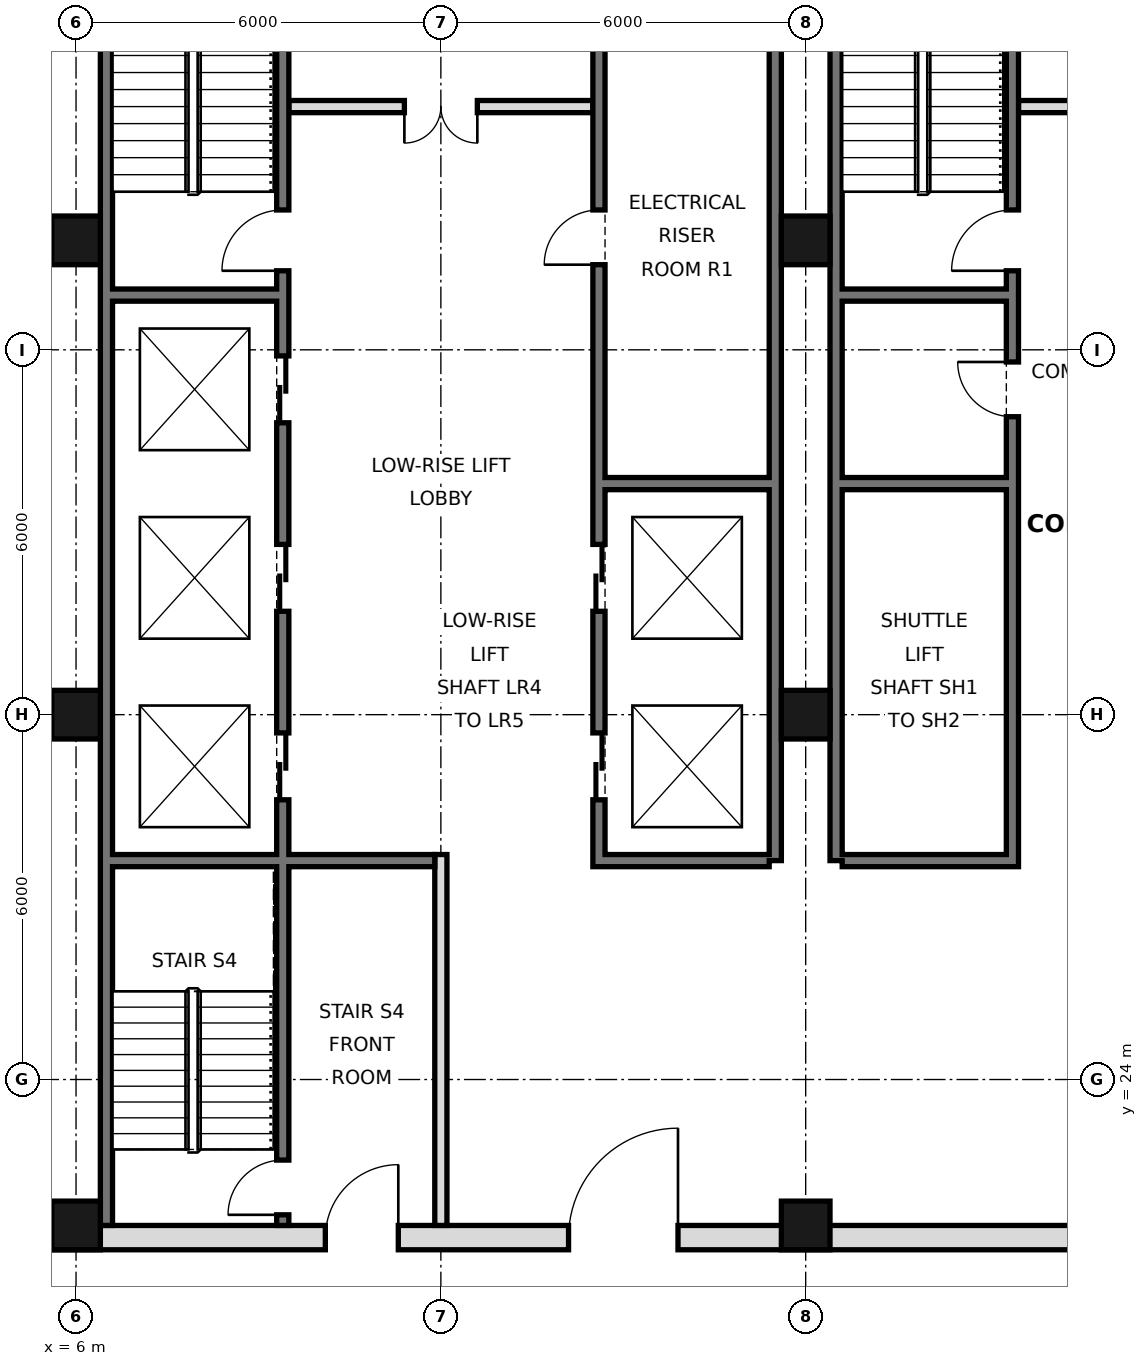
"""IFC4 building model, lengths in metres.
Left out: names, types, materials, properties, quantities, classifications, styles, units other than length and angle.
Written with IfcOpenShell. Run it as: python <this file> out.ifc"""

import sys

from ifc_helpers import new_model, si_unit, direction, frame, frame_2d, origin, origin_2d, place, context, subcontext, project, spatial, rectangle, hollow_rectangle, extrude, element, fill, save


model = new_model("IFC4")
c1 = context("Model", 3, precision=1e-05, world=origin(), true_north=direction((0.0, 1.0)))
c2 = subcontext(c1, "Body", "Model", "MODEL_VIEW")
j1 = project(units=[si_unit("LENGTHUNIT", "METRE"), si_unit("PLANEANGLEUNIT", "RADIAN")], contexts=[c1])
p1 = place(None, origin())
s1 = spatial("IfcSite", under=j1, at=p1, CompositionType="ELEMENT")
p2 = place(p1, origin())
s2 = spatial("IfcBuilding", under=s1, at=p2, CompositionType="ELEMENT")
p3 = place(p2, frame((0.0, 0.0, 49.8)))
s3 = spatial("IfcBuildingStorey", under=s2, at=p3, CompositionType="ELEMENT", Elevation=49.8)
for number, where, z_axis, x_axis in (
    (1, (6.0, 21.6, 0.0), (0.0, 0.0, 1.0), (1.0, 0.0, 0.0)),
    (2, (6.0, 30.0, 0.0), (0.0, 0.0, 1.0), (1.0, 0.0, 0.0)),
    (3, (6.0, 37.8, 0.0), (0.0, 0.0, 1.0), (1.0, 0.0, 0.0)),
    (4, (18.0, 21.6, 0.0), (0.0, 0.0, 1.0), (1.0, 0.0, 0.0)),
    (5, (18.0, 30.0, 0.0), (0.0, 0.0, 1.0), (1.0, 0.0, 0.0)),
    (6, (18.0, 37.8, 0.0), (0.0, 0.0, 1.0), (1.0, 0.0, 0.0)),
):
    element("IfcColumn", number, at=place(p3, frame(where, z_axis=z_axis, x_axis=x_axis)), inside=s3, PredefinedType="COLUMN", context=c2, shape_type="SweptSolid", body=[
        extrude(hollow_rectangle(XDim=0.8, YDim=0.8, WallThickness=0.06, at=origin_2d()), origin(), (0.0, 0.0, 1.0), 3.6),
    ])
p4 = place(p3, frame((6.5, 21.6, 0.0), z_axis=(0.0, 0.0, 1.0), x_axis=(0.0, 1.0, 0.0)))
e7 = element("IfcWall", 7, at=p4, inside=s3, PredefinedType="SOLIDWALL", context=c2, shape_type="SweptSolid", body=[
    extrude(rectangle(XDim=23.5, YDim=0.2, at=frame_2d((11.75, 0.0))), origin(), (0.0, 0.0, 1.0), 3.42),
])
for number, where, z_axis, x_axis in (
    (8, (17.5, 27.6, 0.0), (0.0, 0.0, 1.0), (0.0, 1.0, 0.0)),
    (9, (18.5, 27.6, 0.0), (0.0, 0.0, 1.0), (0.0, 1.0, 0.0)),
):
    element("IfcWall", number, at=place(p3, frame(where, z_axis=z_axis, x_axis=x_axis)), inside=s3, PredefinedType="SOLIDWALL", context=c2, shape_type="SweptSolid", body=[
        extrude(rectangle(XDim=17.5, YDim=0.2, at=frame_2d((8.75, 0.0))), origin(), (0.0, 0.0, 1.0), 3.42),
    ])
p5 = place(p3, frame((5.6, 21.4, 0.0), z_axis=(0.0, 0.0, 1.0), x_axis=(1.0, 0.0, 0.0)))
e10 = element("IfcWall", 10, at=p5, inside=s3, PredefinedType="SOLIDWALL", context=c2, shape_type="SweptSolid", body=[
    extrude(rectangle(XDim=36.8, YDim=0.4, at=frame_2d((18.4, 0.0))), origin(), (0.0, 0.0, 1.0), 3.42),
])
p6 = place(p5, frame((8.5, 0.0, 0.0)))
e11 = element("IfcOpeningElement", 11, at=p6, cuts=e10, PredefinedType="OPENING", context=c2, shape_type="SweptSolid", body=[
    extrude(rectangle(XDim=1.8, YDim=2.1, at=frame_2d((0.9, 1.05))), frame((0.0, 0.21, 0.0), z_axis=(0.0, -1.0, 0.0), x_axis=(1.0, 0.0, 0.0)), (0.0, 0.0, 1.0), 0.42),
])
p7 = place(p5, frame((17.5, 0.0, 0.0)))
e12 = element("IfcOpeningElement", 12, at=p7, cuts=e10, PredefinedType="OPENING", context=c2, shape_type="SweptSolid", body=[
    extrude(rectangle(XDim=1.8, YDim=2.1, at=frame_2d((0.9, 1.05))), frame((0.0, 0.21, 0.0), z_axis=(0.0, -1.0, 0.0), x_axis=(1.0, 0.0, 0.0)), (0.0, 0.0, 1.0), 0.42),
])
p8 = place(p5, frame((26.5, 0.0, 0.0)))
e13 = element("IfcOpeningElement", 13, at=p8, cuts=e10, PredefinedType="OPENING", context=c2, shape_type="SweptSolid", body=[
    extrude(rectangle(XDim=1.8, YDim=2.1, at=frame_2d((0.9, 1.05))), frame((0.0, 0.21, 0.0), z_axis=(0.0, -1.0, 0.0), x_axis=(1.0, 0.0, 0.0)), (0.0, 0.0, 1.0), 0.42),
])
p9 = place(p5, frame((4.5, 0.0, 0.0)))
e14 = element("IfcOpeningElement", 14, at=p9, cuts=e10, PredefinedType="OPENING", context=c2, shape_type="SweptSolid", body=[
    extrude(rectangle(XDim=1.2, YDim=2.1, at=frame_2d((0.6, 1.05))), frame((0.0, 0.21, 0.0), z_axis=(0.0, -1.0, 0.0), x_axis=(1.0, 0.0, 0.0)), (0.0, 0.0, 1.0), 0.42),
])
p10 = place(p5, frame((31.1, 0.0, 0.0)))
e15 = element("IfcOpeningElement", 15, at=p10, cuts=e10, PredefinedType="OPENING", context=c2, shape_type="SweptSolid", body=[
    extrude(rectangle(XDim=1.2, YDim=2.1, at=frame_2d((0.6, 1.05))), frame((0.0, 0.21, 0.0), z_axis=(0.0, -1.0, 0.0), x_axis=(1.0, 0.0, 0.0)), (0.0, 0.0, 1.0), 0.42),
])
p11 = place(p3, frame((12.0, 21.6, 0.0), z_axis=(0.0, 0.0, 1.0), x_axis=(0.0, 1.0, 0.0)))
e16 = element("IfcWall", 16, at=p11, inside=s3, PredefinedType="PARTITIONING", context=c2, shape_type="SweptSolid", body=[
    extrude(rectangle(XDim=6.1, YDim=0.2, at=frame_2d((3.05, 0.0))), origin(), (0.0, 0.0, 1.0), 3.42),
])
p12 = place(p3, frame((14.6, 27.5, 0.0), z_axis=(0.0, 0.0, 1.0), x_axis=(0.0, 1.0, 0.0)))
e17 = element("IfcWall", 17, at=p12, inside=s3, PredefinedType="SOLIDWALL", context=c2, shape_type="SweptSolid", body=[
    extrude(rectangle(XDim=17.5, YDim=0.2, at=frame_2d((8.75, 0.0))), origin(), (0.0, 0.0, 1.0), 3.42),
])
p13 = place(p12, frame((1.1, 0.0, 0.0)))
e18 = element("IfcOpeningElement", 18, at=p13, cuts=e17, PredefinedType="OPENING", context=c2, shape_type="SweptSolid", body=[
    extrude(rectangle(XDim=1.1, YDim=2.1, at=frame_2d((0.55, 1.05))), frame((0.0, 0.11, 0.0), z_axis=(0.0, -1.0, 0.0), x_axis=(1.0, 0.0, 0.0)), (0.0, 0.0, 1.0), 0.22),
])
p14 = place(p12, frame((4.2, 0.0, 0.0)))
e19 = element("IfcOpeningElement", 19, at=p14, cuts=e17, PredefinedType="OPENING", context=c2, shape_type="SweptSolid", body=[
    extrude(rectangle(XDim=1.1, YDim=2.1, at=frame_2d((0.55, 1.05))), frame((0.0, 0.11, 0.0), z_axis=(0.0, -1.0, 0.0), x_axis=(1.0, 0.0, 0.0)), (0.0, 0.0, 1.0), 0.22),
])
p15 = place(p12, frame((15.4, 0.0, 0.0)))
e20 = element("IfcOpeningElement", 20, at=p15, cuts=e17, PredefinedType="OPENING", context=c2, shape_type="SweptSolid", body=[
    extrude(rectangle(XDim=1.1, YDim=2.1, at=frame_2d((0.55, 1.05))), frame((0.0, 0.11, 0.0), z_axis=(0.0, -1.0, 0.0), x_axis=(1.0, 0.0, 0.0)), (0.0, 0.0, 1.0), 0.22),
])
p16 = place(p12, frame((9.9, 0.0, 0.0)))
e21 = element("IfcOpeningElement", 21, at=p16, cuts=e17, PredefinedType="OPENING", context=c2, shape_type="SweptSolid", body=[
    extrude(rectangle(XDim=0.9, YDim=2.1, at=frame_2d((0.45, 1.05))), frame((0.0, 0.11, 0.0), z_axis=(0.0, -1.0, 0.0), x_axis=(1.0, 0.0, 0.0)), (0.0, 0.0, 1.0), 0.22),
])
p17 = place(p3, frame((21.4, 27.5, 0.0), z_axis=(0.0, 0.0, 1.0), x_axis=(0.0, 1.0, 0.0)))
e22 = element("IfcWall", 22, at=p17, inside=s3, PredefinedType="SOLIDWALL", context=c2, shape_type="SweptSolid", body=[
    extrude(rectangle(XDim=17.5, YDim=0.2, at=frame_2d((8.75, 0.0))), origin(), (0.0, 0.0, 1.0), 3.42),
])
p18 = place(p17, frame((9.8, 0.0, 0.0)))
e23 = element("IfcOpeningElement", 23, at=p18, cuts=e22, PredefinedType="OPENING", context=c2, shape_type="SweptSolid", body=[
    extrude(rectangle(XDim=1.0, YDim=2.1, at=frame_2d((0.5, 1.05))), frame((0.0, 0.11, 0.0), z_axis=(0.0, -1.0, 0.0), x_axis=(1.0, 0.0, 0.0)), (0.0, 0.0, 1.0), 0.22),
])
p19 = place(p17, frame((7.4, 0.0, 0.0)))
e24 = element("IfcOpeningElement", 24, at=p19, cuts=e22, PredefinedType="OPENING", context=c2, shape_type="SweptSolid", body=[
    extrude(rectangle(XDim=0.9, YDim=2.1, at=frame_2d((0.45, 1.05))), frame((0.0, 0.11, 0.0), z_axis=(0.0, -1.0, 0.0), x_axis=(1.0, 0.0, 0.0)), (0.0, 0.0, 1.0), 0.22),
])
p20 = place(p3, frame((9.4, 21.6, 0.0), z_axis=(0.0, 0.0, 1.0), x_axis=(0.0, 1.0, 0.0)))
e25 = element("IfcWall", 25, at=p20, inside=s3, PredefinedType="SOLIDWALL", context=c2, shape_type="SweptSolid", body=[
    extrude(rectangle(XDim=23.4, YDim=0.2, at=frame_2d((11.7, 0.0))), origin(), (0.0, 0.0, 1.0), 3.42),
])
p21 = place(p20, frame((7.0, 0.0, 0.0)))
e26 = element("IfcOpeningElement", 26, at=p21, cuts=e25, PredefinedType="OPENING", context=c2, shape_type="SweptSolid", body=[
    extrude(rectangle(XDim=1.1, YDim=2.1, at=frame_2d((0.55, 1.05))), frame((0.0, 0.11, 0.0), z_axis=(0.0, -1.0, 0.0), x_axis=(1.0, 0.0, 0.0)), (0.0, 0.0, 1.0), 0.22),
])
p22 = place(p20, frame((10.1, 0.0, 0.0)))
e27 = element("IfcOpeningElement", 27, at=p22, cuts=e25, PredefinedType="OPENING", context=c2, shape_type="SweptSolid", body=[
    extrude(rectangle(XDim=1.1, YDim=2.1, at=frame_2d((0.55, 1.05))), frame((0.0, 0.11, 0.0), z_axis=(0.0, -1.0, 0.0), x_axis=(1.0, 0.0, 0.0)), (0.0, 0.0, 1.0), 0.22),
])
p23 = place(p20, frame((13.2, 0.0, 0.0)))
e28 = element("IfcOpeningElement", 28, at=p23, cuts=e25, PredefinedType="OPENING", context=c2, shape_type="SweptSolid", body=[
    extrude(rectangle(XDim=1.1, YDim=2.1, at=frame_2d((0.55, 1.05))), frame((0.0, 0.11, 0.0), z_axis=(0.0, -1.0, 0.0), x_axis=(1.0, 0.0, 0.0)), (0.0, 0.0, 1.0), 0.22),
])
p24 = place(p20, frame((15.7, 0.0, 0.0)))
e29 = element("IfcOpeningElement", 29, at=p24, cuts=e25, PredefinedType="OPENING", context=c2, shape_type="SweptSolid", body=[
    extrude(rectangle(XDim=1.0, YDim=2.1, at=frame_2d((0.5, 1.05))), frame((0.0, 0.11, 0.0), z_axis=(0.0, -1.0, 0.0), x_axis=(1.0, 0.0, 0.0)), (0.0, 0.0, 1.0), 0.22),
])
p25 = place(p20, frame((0.175, 0.0, 0.0)))
e30 = element("IfcOpeningElement", 30, at=p25, cuts=e25, PredefinedType="OPENING", context=c2, shape_type="SweptSolid", body=[
    extrude(rectangle(XDim=0.9, YDim=2.1, at=frame_2d((0.45, 1.05))), frame((0.0, 0.11, 0.0), z_axis=(0.0, -1.0, 0.0), x_axis=(1.0, 0.0, 0.0)), (0.0, 0.0, 1.0), 0.22),
])
for number, where, z_axis, x_axis in (
    (31, (14.7, 27.6, 0.0), (0.0, 0.0, 1.0), (1.0, 0.0, 0.0)),
    (32, (18.6, 27.6, 0.0), (0.0, 0.0, 1.0), (1.0, 0.0, 0.0)),
):
    element("IfcWall", number, at=place(p3, frame(where, z_axis=z_axis, x_axis=x_axis)), inside=s3, PredefinedType="SOLIDWALL", context=c2, shape_type="SweptSolid", body=[
        extrude(rectangle(XDim=2.7, YDim=0.2, at=frame_2d((1.35, 0.0))), origin(), (0.0, 0.0, 1.0), 3.42),
    ])
p26 = place(p3, frame((6.6, 27.6, 0.0), z_axis=(0.0, 0.0, 1.0), x_axis=(1.0, 0.0, 0.0)))
e33 = element("IfcWall", 33, at=p26, inside=s3, PredefinedType="SOLIDWALL", context=c2, shape_type="SweptSolid", body=[
    extrude(rectangle(XDim=5.3, YDim=0.2, at=frame_2d((2.65, 0.0))), origin(), (0.0, 0.0, 1.0), 3.42),
])
for number, where, z_axis, x_axis in (
    (34, (14.7, 33.8, 0.0), (0.0, 0.0, 1.0), (1.0, 0.0, 0.0)),
    (35, (18.6, 33.8, 0.0), (0.0, 0.0, 1.0), (1.0, 0.0, 0.0)),
    (36, (18.6, 36.9, 0.0), (0.0, 0.0, 1.0), (1.0, 0.0, 0.0)),
    (37, (6.6, 36.9, 0.0), (0.0, 0.0, 1.0), (1.0, 0.0, 0.0)),
):
    element("IfcWall", number, at=place(p3, frame(where, z_axis=z_axis, x_axis=x_axis)), inside=s3, PredefinedType="SOLIDWALL", context=c2, shape_type="SweptSolid", body=[
        extrude(rectangle(XDim=2.7, YDim=0.2, at=frame_2d((1.35, 0.0))), origin(), (0.0, 0.0, 1.0), 3.42),
    ])
p27 = place(p3, frame((21.5, 40.0, 0.0), z_axis=(0.0, 0.0, 1.0), x_axis=(1.0, 0.0, 0.0)))
e38 = element("IfcWall", 38, at=p27, inside=s3, PredefinedType="PARTITIONING", context=c2, shape_type="SweptSolid", body=[
    extrude(rectangle(XDim=7.9, YDim=0.2, at=frame_2d((3.95, 0.0))), origin(), (0.0, 0.0, 1.0), 3.42),
])
p28 = place(p27, frame((1.9, 0.0, 0.0)))
e39 = element("IfcOpeningElement", 39, at=p28, cuts=e38, PredefinedType="OPENING", context=c2, shape_type="SweptSolid", body=[
    extrude(rectangle(XDim=1.2, YDim=2.1, at=frame_2d((0.6, 1.05))), frame((0.0, 0.11, 0.0), z_axis=(0.0, -1.0, 0.0), x_axis=(1.0, 0.0, 0.0)), (0.0, 0.0, 1.0), 0.22),
])
p29 = place(p3, frame((9.5, 40.0, 0.0), z_axis=(0.0, 0.0, 1.0), x_axis=(1.0, 0.0, 0.0)))
e40 = element("IfcWall", 40, at=p29, inside=s3, PredefinedType="PARTITIONING", context=c2, shape_type="SweptSolid", body=[
    extrude(rectangle(XDim=5.0, YDim=0.2, at=frame_2d((2.5, 0.0))), origin(), (0.0, 0.0, 1.0), 3.42),
])
p30 = place(p29, frame((1.9, 0.0, 0.0)))
e41 = element("IfcOpeningElement", 41, at=p30, cuts=e40, PredefinedType="OPENING", context=c2, shape_type="SweptSolid", body=[
    extrude(rectangle(XDim=1.2, YDim=2.1, at=frame_2d((0.6, 1.05))), frame((0.0, 0.11, 0.0), z_axis=(0.0, -1.0, 0.0), x_axis=(1.0, 0.0, 0.0)), (0.0, 0.0, 1.0), 0.22),
])
p31 = place(p6, frame((1.8, 0.0, 0.0), z_axis=(0.0, 0.0, 1.0), x_axis=(-1.0, 0.0, 0.0)))
e42 = element("IfcDoor", 42, at=p31, inside=s3, OperationType="SINGLE_SWING_LEFT", PredefinedType="DOOR", context=c2, shape_type="SweptSolid", body=[
    extrude(rectangle(XDim=1.8, YDim=2.1, at=frame_2d((0.9, 1.05))), frame((0.0, 0.025, 0.0), z_axis=(0.0, -1.0, 0.0), x_axis=(1.0, 0.0, 0.0)), (0.0, 0.0, 1.0), 0.05),
])
fill(e11, e42)
p32 = place(p9, frame((1.2, 0.0, 0.0), z_axis=(0.0, 0.0, 1.0), x_axis=(-1.0, 0.0, 0.0)))
e43 = element("IfcDoor", 43, at=p32, inside=s3, OperationType="SINGLE_SWING_LEFT", PredefinedType="DOOR", context=c2, shape_type="SweptSolid", body=[
    extrude(rectangle(XDim=1.2, YDim=2.1, at=frame_2d((0.6, 1.05))), frame((0.0, 0.025, 0.0), z_axis=(0.0, -1.0, 0.0), x_axis=(1.0, 0.0, 0.0)), (0.0, 0.0, 1.0), 0.05),
])
fill(e14, e43)
p33 = place(p30, frame((1.2, 0.0, 0.0), z_axis=(0.0, 0.0, 1.0), x_axis=(-1.0, 0.0, 0.0)))
e44 = element("IfcDoor", 44, at=p33, inside=s3, OperationType="DOUBLE_DOOR_SINGLE_SWING", PredefinedType="DOOR", context=c2, shape_type="SweptSolid", body=[
    extrude(rectangle(XDim=1.2, YDim=2.1, at=frame_2d((0.6, 1.05))), frame((0.0, 0.025, 0.0), z_axis=(0.0, -1.0, 0.0), x_axis=(1.0, 0.0, 0.0)), (0.0, 0.0, 1.0), 0.05),
])
fill(e41, e44)
p34 = place(p13, origin())
e45 = element("IfcDoor", 45, at=p34, inside=s3, OperationType="DOUBLE_DOOR_SLIDING", PredefinedType="DOOR", context=c2, shape_type="SweptSolid", body=[
    extrude(rectangle(XDim=1.1, YDim=2.1, at=frame_2d((0.55, 1.05))), frame((0.0, 0.025, 0.0), z_axis=(0.0, -1.0, 0.0), x_axis=(1.0, 0.0, 0.0)), (0.0, 0.0, 1.0), 0.05),
])
fill(e18, e45)
p35 = place(p14, origin())
e46 = element("IfcDoor", 46, at=p35, inside=s3, OperationType="DOUBLE_DOOR_SLIDING", PredefinedType="DOOR", context=c2, shape_type="SweptSolid", body=[
    extrude(rectangle(XDim=1.1, YDim=2.1, at=frame_2d((0.55, 1.05))), frame((0.0, 0.025, 0.0), z_axis=(0.0, -1.0, 0.0), x_axis=(1.0, 0.0, 0.0)), (0.0, 0.0, 1.0), 0.05),
])
fill(e19, e46)
p36 = place(p21, origin())
e47 = element("IfcDoor", 47, at=p36, inside=s3, OperationType="DOUBLE_DOOR_SLIDING", PredefinedType="DOOR", context=c2, shape_type="SweptSolid", body=[
    extrude(rectangle(XDim=1.1, YDim=2.1, at=frame_2d((0.55, 1.05))), frame((0.0, 0.025, 0.0), z_axis=(0.0, -1.0, 0.0), x_axis=(1.0, 0.0, 0.0)), (0.0, 0.0, 1.0), 0.05),
])
fill(e26, e47)
p37 = place(p22, origin())
e48 = element("IfcDoor", 48, at=p37, inside=s3, OperationType="DOUBLE_DOOR_SLIDING", PredefinedType="DOOR", context=c2, shape_type="SweptSolid", body=[
    extrude(rectangle(XDim=1.1, YDim=2.1, at=frame_2d((0.55, 1.05))), frame((0.0, 0.025, 0.0), z_axis=(0.0, -1.0, 0.0), x_axis=(1.0, 0.0, 0.0)), (0.0, 0.0, 1.0), 0.05),
])
fill(e27, e48)
p38 = place(p23, origin())
e49 = element("IfcDoor", 49, at=p38, inside=s3, OperationType="DOUBLE_DOOR_SLIDING", PredefinedType="DOOR", context=c2, shape_type="SweptSolid", body=[
    extrude(rectangle(XDim=1.1, YDim=2.1, at=frame_2d((0.55, 1.05))), frame((0.0, 0.025, 0.0), z_axis=(0.0, -1.0, 0.0), x_axis=(1.0, 0.0, 0.0)), (0.0, 0.0, 1.0), 0.05),
])
fill(e28, e49)
p39 = place(p24, origin())
e50 = element("IfcDoor", 50, at=p39, inside=s3, OperationType="SINGLE_SWING_LEFT", PredefinedType="DOOR", context=c2, shape_type="SweptSolid", body=[
    extrude(rectangle(XDim=1.0, YDim=2.1, at=frame_2d((0.5, 1.05))), frame((0.0, 0.025, 0.0), z_axis=(0.0, -1.0, 0.0), x_axis=(1.0, 0.0, 0.0)), (0.0, 0.0, 1.0), 0.05),
])
fill(e29, e50)
p40 = place(p18, origin())
e51 = element("IfcDoor", 51, at=p40, inside=s3, OperationType="SINGLE_SWING_LEFT", PredefinedType="DOOR", context=c2, shape_type="SweptSolid", body=[
    extrude(rectangle(XDim=1.0, YDim=2.1, at=frame_2d((0.5, 1.05))), frame((0.0, 0.025, 0.0), z_axis=(0.0, -1.0, 0.0), x_axis=(1.0, 0.0, 0.0)), (0.0, 0.0, 1.0), 0.05),
])
fill(e23, e51)
p41 = place(p25, origin())
e52 = element("IfcDoor", 52, at=p41, inside=s3, OperationType="SINGLE_SWING_LEFT", PredefinedType="DOOR", context=c2, shape_type="SweptSolid", body=[
    extrude(rectangle(XDim=0.9, YDim=2.1, at=frame_2d((0.45, 1.05))), frame((0.0, 0.025, 0.0), z_axis=(0.0, -1.0, 0.0), x_axis=(1.0, 0.0, 0.0)), (0.0, 0.0, 1.0), 0.05),
])
fill(e30, e52)
p42 = place(p16, origin())
e53 = element("IfcDoor", 53, at=p42, inside=s3, OperationType="SINGLE_SWING_LEFT", PredefinedType="DOOR", context=c2, shape_type="SweptSolid", body=[
    extrude(rectangle(XDim=0.9, YDim=2.1, at=frame_2d((0.45, 1.05))), frame((0.0, 0.025, 0.0), z_axis=(0.0, -1.0, 0.0), x_axis=(1.0, 0.0, 0.0)), (0.0, 0.0, 1.0), 0.05),
])
fill(e21, e53)
p43 = place(p19, frame((0.9, 0.0, 0.0), z_axis=(0.0, 0.0, 1.0), x_axis=(-1.0, 0.0, 0.0)))
e54 = element("IfcDoor", 54, at=p43, inside=s3, OperationType="SINGLE_SWING_LEFT", PredefinedType="DOOR", context=c2, shape_type="SweptSolid", body=[
    extrude(rectangle(XDim=0.9, YDim=2.1, at=frame_2d((0.45, 1.05))), frame((0.0, 0.025, 0.0), z_axis=(0.0, -1.0, 0.0), x_axis=(1.0, 0.0, 0.0)), (0.0, 0.0, 1.0), 0.05),
])
fill(e24, e54)
save(model, sys.argv[1])
